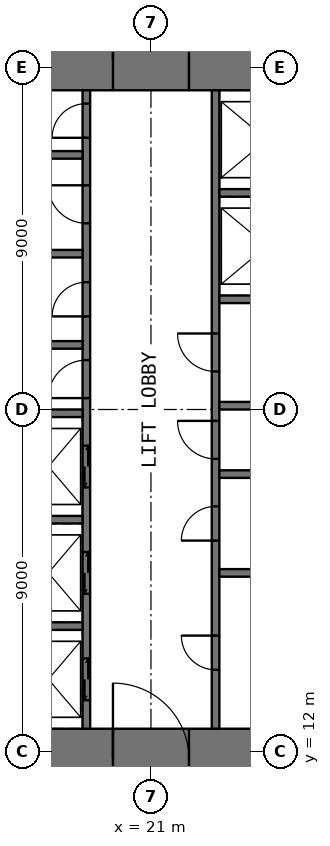
"""IFC4 building model, lengths in metres.
Left out: names, types, materials, properties, quantities, classifications, styles, units other than length and angle.
Written with IfcOpenShell. Run it as: python <this file> out.ifc"""

import sys

from ifc_helpers import new_model, si_unit, direction, frame, frame_2d, origin, place, context, subcontext, project, spatial, rectangle, extrude, element, fill, save


model = new_model("IFC4")
c1 = context("Model", 3, precision=1e-05, world=origin(), true_north=direction((0.0, 1.0)))
c2 = subcontext(c1, "Body", "Model", "MODEL_VIEW")
j1 = project(units=[si_unit("LENGTHUNIT", "METRE"), si_unit("PLANEANGLEUNIT", "RADIAN")], contexts=[c1])
p1 = place(None, origin())
s1 = spatial("IfcSite", under=j1, at=p1, CompositionType="ELEMENT")
p2 = place(p1, origin())
s2 = spatial("IfcBuilding", under=s1, at=p2, CompositionType="ELEMENT")
p3 = place(p2, frame((0.0, 0.0, 152.5)))
s3 = spatial("IfcBuildingStorey", under=s2, at=p3, CompositionType="ELEMENT", Elevation=152.5)
p4 = place(p3, frame((11.0, 11.8, -0.05), z_axis=(0.0, 0.0, 1.0), x_axis=(1.0, 0.0, 0.0)))
e1 = element("IfcWall", 1, at=p4, inside=s3, PredefinedType="SHEAR", context=c2, shape_type="SweptSolid", body=[
    extrude(rectangle(XDim=20.0, YDim=1.6, at=frame_2d((10.0, 0.0))), origin(), (0.0, 0.0, 1.0), 4.0),
])
p5 = place(p4, frame((9.0, 0.0, 0.05)))
e2 = element("IfcOpeningElement", 2, at=p5, cuts=e1, PredefinedType="OPENING", context=c2, shape_type="SweptSolid", body=[
    extrude(rectangle(XDim=2.0, YDim=2.2, at=frame_2d((1.0, 1.1))), frame((0.0, 0.81, 0.0), z_axis=(0.0, -1.0, 0.0), x_axis=(1.0, 0.0, 0.0)), (0.0, 0.0, 1.0), 1.62),
])
p6 = place(p3, frame((11.0, 30.2, -0.05), z_axis=(0.0, 0.0, 1.0), x_axis=(1.0, 0.0, 0.0)))
e3 = element("IfcWall", 3, at=p6, inside=s3, PredefinedType="SHEAR", context=c2, shape_type="SweptSolid", body=[
    extrude(rectangle(XDim=20.0, YDim=1.6, at=frame_2d((10.0, 0.0))), origin(), (0.0, 0.0, 1.0), 4.0),
])
p7 = place(p6, frame((9.0, 0.0, 0.05)))
e4 = element("IfcOpeningElement", 4, at=p7, cuts=e3, PredefinedType="OPENING", context=c2, shape_type="SweptSolid", body=[
    extrude(rectangle(XDim=2.0, YDim=2.2, at=frame_2d((1.0, 1.1))), frame((0.0, 0.81, 0.0), z_axis=(0.0, -1.0, 0.0), x_axis=(1.0, 0.0, 0.0)), (0.0, 0.0, 1.0), 1.62),
])
p8 = place(p3, frame((19.3, 12.6, -0.05), z_axis=(0.0, 0.0, 1.0), x_axis=(0.0, 1.0, 0.0)))
e5 = element("IfcWall", 5, at=p8, inside=s3, PredefinedType="SHEAR", context=c2, shape_type="SweptSolid", body=[
    extrude(rectangle(XDim=16.8, YDim=0.2, at=frame_2d((8.4, 0.0))), origin(), (0.0, 0.0, 1.0), 4.0),
])
p9 = place(p8, frame((8.7, 0.0, 0.05)))
e6 = element("IfcOpeningElement", 6, at=p9, cuts=e5, PredefinedType="OPENING", context=c2, shape_type="SweptSolid", body=[
    extrude(rectangle(XDim=1.0, YDim=2.2, at=frame_2d((0.5, 1.1))), frame((0.0, 0.11, 0.0), z_axis=(0.0, -1.0, 0.0), x_axis=(1.0, 0.0, 0.0)), (0.0, 0.0, 1.0), 0.22),
])
p10 = place(p8, frame((10.85, 0.0, 0.05)))
e7 = element("IfcOpeningElement", 7, at=p10, cuts=e5, PredefinedType="OPENING", context=c2, shape_type="SweptSolid", body=[
    extrude(rectangle(XDim=0.9, YDim=2.2, at=frame_2d((0.45, 1.1))), frame((0.0, 0.11, 0.0), z_axis=(0.0, -1.0, 0.0), x_axis=(1.0, 0.0, 0.0)), (0.0, 0.0, 1.0), 0.22),
])
p11 = place(p8, frame((13.3, 0.0, 0.05)))
e8 = element("IfcOpeningElement", 8, at=p11, cuts=e5, PredefinedType="OPENING", context=c2, shape_type="SweptSolid", body=[
    extrude(rectangle(XDim=1.0, YDim=2.2, at=frame_2d((0.5, 1.1))), frame((0.0, 0.11, 0.0), z_axis=(0.0, -1.0, 0.0), x_axis=(1.0, 0.0, 0.0)), (0.0, 0.0, 1.0), 0.22),
])
p12 = place(p8, frame((15.55, 0.0, 0.05)))
e9 = element("IfcOpeningElement", 9, at=p12, cuts=e5, PredefinedType="OPENING", context=c2, shape_type="SweptSolid", body=[
    extrude(rectangle(XDim=0.9, YDim=2.2, at=frame_2d((0.45, 1.1))), frame((0.0, 0.11, 0.0), z_axis=(0.0, -1.0, 0.0), x_axis=(1.0, 0.0, 0.0)), (0.0, 0.0, 1.0), 0.22),
])
p13 = place(p8, frame((0.75, 0.0, 0.05)))
e10 = element("IfcOpeningElement", 10, at=p13, cuts=e5, PredefinedType="OPENING", context=c2, shape_type="SweptSolid", body=[
    extrude(rectangle(XDim=1.1, YDim=2.2, at=frame_2d((0.55, 1.1))), frame((0.0, 0.11, 0.0), z_axis=(0.0, -1.0, 0.0), x_axis=(1.0, 0.0, 0.0)), (0.0, 0.0, 1.0), 0.22),
])
p14 = place(p8, frame((3.55, 0.0, 0.05)))
e11 = element("IfcOpeningElement", 11, at=p14, cuts=e5, PredefinedType="OPENING", context=c2, shape_type="SweptSolid", body=[
    extrude(rectangle(XDim=1.1, YDim=2.2, at=frame_2d((0.55, 1.1))), frame((0.0, 0.11, 0.0), z_axis=(0.0, -1.0, 0.0), x_axis=(1.0, 0.0, 0.0)), (0.0, 0.0, 1.0), 0.22),
])
p15 = place(p8, frame((6.35, 0.0, 0.05)))
e12 = element("IfcOpeningElement", 12, at=p15, cuts=e5, PredefinedType="OPENING", context=c2, shape_type="SweptSolid", body=[
    extrude(rectangle(XDim=1.1, YDim=2.2, at=frame_2d((0.55, 1.1))), frame((0.0, 0.11, 0.0), z_axis=(0.0, -1.0, 0.0), x_axis=(1.0, 0.0, 0.0)), (0.0, 0.0, 1.0), 0.22),
])
p16 = place(p3, frame((22.7, 12.6, -0.05), z_axis=(0.0, 0.0, 1.0), x_axis=(0.0, 1.0, 0.0)))
e13 = element("IfcWall", 13, at=p16, inside=s3, PredefinedType="SHEAR", context=c2, shape_type="SweptSolid", body=[
    extrude(rectangle(XDim=16.8, YDim=0.2, at=frame_2d((8.4, 0.0))), origin(), (0.0, 0.0, 1.0), 4.0),
])
p17 = place(p16, frame((7.1, 0.0, 0.05)))
e14 = element("IfcOpeningElement", 14, at=p17, cuts=e13, PredefinedType="OPENING", context=c2, shape_type="SweptSolid", body=[
    extrude(rectangle(XDim=1.0, YDim=2.2, at=frame_2d((0.5, 1.1))), frame((0.0, 0.11, 0.0), z_axis=(0.0, -1.0, 0.0), x_axis=(1.0, 0.0, 0.0)), (0.0, 0.0, 1.0), 0.22),
])
p18 = place(p16, frame((1.55, 0.0, 0.05)))
e15 = element("IfcOpeningElement", 15, at=p18, cuts=e13, PredefinedType="OPENING", context=c2, shape_type="SweptSolid", body=[
    extrude(rectangle(XDim=0.9, YDim=2.2, at=frame_2d((0.45, 1.1))), frame((0.0, 0.11, 0.0), z_axis=(0.0, -1.0, 0.0), x_axis=(1.0, 0.0, 0.0)), (0.0, 0.0, 1.0), 0.22),
])
p19 = place(p16, frame((4.95, 0.0, 0.05)))
e16 = element("IfcOpeningElement", 16, at=p19, cuts=e13, PredefinedType="OPENING", context=c2, shape_type="SweptSolid", body=[
    extrude(rectangle(XDim=0.9, YDim=2.2, at=frame_2d((0.45, 1.1))), frame((0.0, 0.11, 0.0), z_axis=(0.0, -1.0, 0.0), x_axis=(1.0, 0.0, 0.0)), (0.0, 0.0, 1.0), 0.22),
])
p20 = place(p16, frame((9.4, 0.0, 0.05)))
e17 = element("IfcOpeningElement", 17, at=p20, cuts=e13, PredefinedType="OPENING", context=c2, shape_type="SweptSolid", body=[
    extrude(rectangle(XDim=1.0, YDim=2.2, at=frame_2d((0.5, 1.1))), frame((0.0, 0.11, 0.0), z_axis=(0.0, -1.0, 0.0), x_axis=(1.0, 0.0, 0.0)), (0.0, 0.0, 1.0), 0.22),
])
for number, where, z_axis, x_axis in (
    (18, (16.0, 15.3, -0.05), (0.0, 0.0, 1.0), (1.0, 0.0, 0.0)),
    (19, (16.0, 18.1, -0.05), (0.0, 0.0, 1.0), (1.0, 0.0, 0.0)),
    (20, (16.0, 20.9, -0.05), (0.0, 0.0, 1.0), (1.0, 0.0, 0.0)),
    (21, (16.0, 22.7, -0.05), (0.0, 0.0, 1.0), (1.0, 0.0, 0.0)),
    (22, (16.0, 25.1, -0.05), (0.0, 0.0, 1.0), (1.0, 0.0, 0.0)),
    (23, (16.0, 27.7, -0.05), (0.0, 0.0, 1.0), (1.0, 0.0, 0.0)),
    (24, (22.8, 16.7, -0.05), (0.0, 0.0, 1.0), (1.0, 0.0, 0.0)),
    (25, (22.8, 19.3, -0.05), (0.0, 0.0, 1.0), (1.0, 0.0, 0.0)),
    (26, (22.8, 21.1, -0.05), (0.0, 0.0, 1.0), (1.0, 0.0, 0.0)),
    (27, (22.8, 23.9, -0.05), (0.0, 0.0, 1.0), (1.0, 0.0, 0.0)),
    (28, (22.8, 26.7, -0.05), (0.0, 0.0, 1.0), (1.0, 0.0, 0.0)),
):
    element("IfcWall", number, at=place(p3, frame(where, z_axis=z_axis, x_axis=x_axis)), inside=s3, PredefinedType="SHEAR", context=c2, shape_type="SweptSolid", body=[
        extrude(rectangle(XDim=3.2, YDim=0.2, at=frame_2d((1.6, 0.0))), origin(), (0.0, 0.0, 1.0), 4.0),
    ])
p21 = place(p5, origin())
e29 = element("IfcDoor", 29, at=p21, inside=s3, OperationType="DOUBLE_DOOR_SINGLE_SWING", PredefinedType="DOOR", context=c2, shape_type="SweptSolid", body=[
    extrude(rectangle(XDim=2.0, YDim=2.2, at=frame_2d((1.0, 1.1))), frame((0.0, 0.025, 0.0), z_axis=(0.0, -1.0, 0.0), x_axis=(1.0, 0.0, 0.0)), (0.0, 0.0, 1.0), 0.05),
])
fill(e2, e29)
p22 = place(p7, origin())
e30 = element("IfcDoor", 30, at=p22, inside=s3, OperationType="DOUBLE_DOOR_SINGLE_SWING", PredefinedType="DOOR", context=c2, shape_type="SweptSolid", body=[
    extrude(rectangle(XDim=2.0, YDim=2.2, at=frame_2d((1.0, 1.1))), frame((0.0, 0.025, 0.0), z_axis=(0.0, -1.0, 0.0), x_axis=(1.0, 0.0, 0.0)), (0.0, 0.0, 1.0), 0.05),
])
fill(e4, e30)
p23 = place(p9, origin())
e31 = element("IfcDoor", 31, at=p23, inside=s3, OperationType="SINGLE_SWING_LEFT", PredefinedType="DOOR", context=c2, shape_type="SweptSolid", body=[
    extrude(rectangle(XDim=1.0, YDim=2.2, at=frame_2d((0.5, 1.1))), frame((0.0, 0.025, 0.0), z_axis=(0.0, -1.0, 0.0), x_axis=(1.0, 0.0, 0.0)), (0.0, 0.0, 1.0), 0.05),
])
fill(e6, e31)
p24 = place(p17, origin())
e32 = element("IfcDoor", 32, at=p24, inside=s3, OperationType="SINGLE_SWING_RIGHT", PredefinedType="DOOR", context=c2, shape_type="SweptSolid", body=[
    extrude(rectangle(XDim=1.0, YDim=2.2, at=frame_2d((0.5, 1.1))), frame((0.0, 0.025, 0.0), z_axis=(0.0, -1.0, 0.0), x_axis=(1.0, 0.0, 0.0)), (0.0, 0.0, 1.0), 0.05),
])
fill(e14, e32)
p25 = place(p10, origin())
e33 = element("IfcDoor", 33, at=p25, inside=s3, OperationType="SINGLE_SWING_LEFT", PredefinedType="DOOR", context=c2, shape_type="SweptSolid", body=[
    extrude(rectangle(XDim=0.9, YDim=2.2, at=frame_2d((0.45, 1.1))), frame((0.0, 0.025, 0.0), z_axis=(0.0, -1.0, 0.0), x_axis=(1.0, 0.0, 0.0)), (0.0, 0.0, 1.0), 0.05),
])
fill(e7, e33)
p26 = place(p11, origin())
e34 = element("IfcDoor", 34, at=p26, inside=s3, OperationType="SINGLE_SWING_RIGHT", PredefinedType="DOOR", context=c2, shape_type="SweptSolid", body=[
    extrude(rectangle(XDim=1.0, YDim=2.2, at=frame_2d((0.5, 1.1))), frame((0.0, 0.025, 0.0), z_axis=(0.0, -1.0, 0.0), x_axis=(1.0, 0.0, 0.0)), (0.0, 0.0, 1.0), 0.05),
])
fill(e8, e34)
p27 = place(p12, origin())
e35 = element("IfcDoor", 35, at=p27, inside=s3, OperationType="SINGLE_SWING_LEFT", PredefinedType="DOOR", context=c2, shape_type="SweptSolid", body=[
    extrude(rectangle(XDim=0.9, YDim=2.2, at=frame_2d((0.45, 1.1))), frame((0.0, 0.025, 0.0), z_axis=(0.0, -1.0, 0.0), x_axis=(1.0, 0.0, 0.0)), (0.0, 0.0, 1.0), 0.05),
])
fill(e9, e35)
p28 = place(p18, origin())
e36 = element("IfcDoor", 36, at=p28, inside=s3, OperationType="SINGLE_SWING_RIGHT", PredefinedType="DOOR", context=c2, shape_type="SweptSolid", body=[
    extrude(rectangle(XDim=0.9, YDim=2.2, at=frame_2d((0.45, 1.1))), frame((0.0, 0.025, 0.0), z_axis=(0.0, -1.0, 0.0), x_axis=(1.0, 0.0, 0.0)), (0.0, 0.0, 1.0), 0.05),
])
fill(e15, e36)
p29 = place(p19, origin())
e37 = element("IfcDoor", 37, at=p29, inside=s3, OperationType="SINGLE_SWING_LEFT", PredefinedType="DOOR", context=c2, shape_type="SweptSolid", body=[
    extrude(rectangle(XDim=0.9, YDim=2.2, at=frame_2d((0.45, 1.1))), frame((0.0, 0.025, 0.0), z_axis=(0.0, -1.0, 0.0), x_axis=(1.0, 0.0, 0.0)), (0.0, 0.0, 1.0), 0.05),
])
fill(e16, e37)
p30 = place(p20, origin())
e38 = element("IfcDoor", 38, at=p30, inside=s3, OperationType="SINGLE_SWING_RIGHT", PredefinedType="DOOR", context=c2, shape_type="SweptSolid", body=[
    extrude(rectangle(XDim=1.0, YDim=2.2, at=frame_2d((0.5, 1.1))), frame((0.0, 0.025, 0.0), z_axis=(0.0, -1.0, 0.0), x_axis=(1.0, 0.0, 0.0)), (0.0, 0.0, 1.0), 0.05),
])
fill(e17, e38)
p31 = place(p13, origin())
e39 = element("IfcDoor", 39, at=p31, inside=s3, OperationType="DOUBLE_DOOR_SLIDING", PredefinedType="DOOR", context=c2, shape_type="SweptSolid", body=[
    extrude(rectangle(XDim=1.1, YDim=2.2, at=frame_2d((0.55, 1.1))), frame((0.0, 0.025, 0.0), z_axis=(0.0, -1.0, 0.0), x_axis=(1.0, 0.0, 0.0)), (0.0, 0.0, 1.0), 0.05),
])
fill(e10, e39)
p32 = place(p14, origin())
e40 = element("IfcDoor", 40, at=p32, inside=s3, OperationType="DOUBLE_DOOR_SLIDING", PredefinedType="DOOR", context=c2, shape_type="SweptSolid", body=[
    extrude(rectangle(XDim=1.1, YDim=2.2, at=frame_2d((0.55, 1.1))), frame((0.0, 0.025, 0.0), z_axis=(0.0, -1.0, 0.0), x_axis=(1.0, 0.0, 0.0)), (0.0, 0.0, 1.0), 0.05),
])
fill(e11, e40)
p33 = place(p15, origin())
e41 = element("IfcDoor", 41, at=p33, inside=s3, OperationType="DOUBLE_DOOR_SLIDING", PredefinedType="DOOR", context=c2, shape_type="SweptSolid", body=[
    extrude(rectangle(XDim=1.1, YDim=2.2, at=frame_2d((0.55, 1.1))), frame((0.0, 0.025, 0.0), z_axis=(0.0, -1.0, 0.0), x_axis=(1.0, 0.0, 0.0)), (0.0, 0.0, 1.0), 0.05),
])
fill(e12, e41)
save(model, sys.argv[1])
